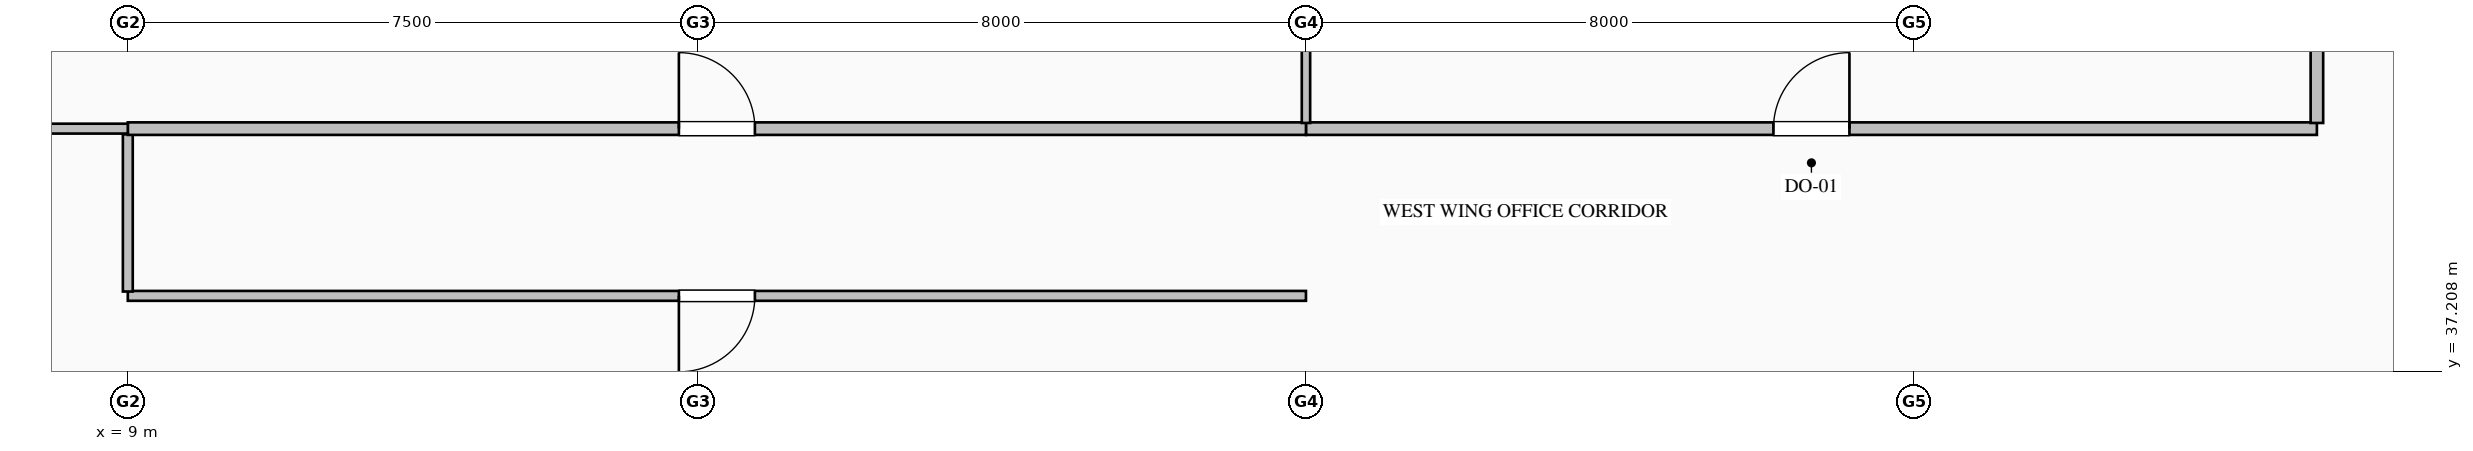
"""IFC4 building model, lengths in metres.
Left out: names, types, materials, properties, quantities, classifications, styles, units other than length and angle.
Written with IfcOpenShell. Run it as: python <this file> out.ifc"""

import sys

from ifc_helpers import new_model, si_unit, direction, frame, frame_2d, origin, place, context, subcontext, project, spatial, rectangle, extrude, element, fill, save


model = new_model("IFC4")
c1 = context("Model", 3, precision=1e-05, world=origin(), true_north=direction((0.0, 1.0)))
c2 = subcontext(c1, "Body", "Model", "MODEL_VIEW")
j1 = project(units=[si_unit("LENGTHUNIT", "METRE"), si_unit("PLANEANGLEUNIT", "RADIAN")], contexts=[c1])
p1 = place(None, origin())
s1 = spatial("IfcSite", under=j1, at=p1, CompositionType="ELEMENT")
p2 = place(p1, origin())
s2 = spatial("IfcBuilding", under=s1, at=p2, CompositionType="ELEMENT")
p3 = place(p2, frame((0.0, 0.0, 72.2)))
s3 = spatial("IfcBuildingStorey", under=s2, at=p3, CompositionType="ELEMENT", Elevation=72.2)
p4 = place(p3, frame((24.5, 40.4, 0.0), z_axis=(0.0, 0.0, 1.0), x_axis=(1.0, 0.0, 0.0)))
e1 = element("IfcWall", 1, at=p4, inside=s3, PredefinedType="PARTITIONING", context=c2, shape_type="SweptSolid", body=[
    extrude(rectangle(XDim=13.3, YDim=0.165, at=frame_2d((6.65, 0.0))), origin(), (0.0, 0.0, 1.0), 3.75),
])
p5 = place(p4, frame((6.15, 0.0, 0.0)))
e2 = element("IfcOpeningElement", 2, at=p5, cuts=e1, PredefinedType="OPENING", context=c2, shape_type="SweptSolid", body=[
    extrude(rectangle(XDim=1.0, YDim=2.15, at=frame_2d((0.5, 1.075))), frame((0.0, 0.093, 0.0), z_axis=(0.0, -1.0, 0.0), x_axis=(1.0, 0.0, 0.0)), (0.0, 0.0, 1.0), 0.185),
])
p6 = place(p3, frame((24.5, 38.2, 0.0), z_axis=(0.0, 0.0, 1.0), x_axis=(-1.0, 0.0, 0.0)))
e3 = element("IfcWall", 3, at=p6, inside=s3, PredefinedType="PARTITIONING", context=c2, shape_type="SweptSolid", body=[
    extrude(rectangle(XDim=15.5, YDim=0.13, at=frame_2d((7.75, 0.0))), origin(), (0.0, 0.0, 1.0), 3.75),
])
p7 = place(p6, frame((7.25, 0.0, 0.0)))
e4 = element("IfcOpeningElement", 4, at=p7, cuts=e3, PredefinedType="OPENING", context=c2, shape_type="SweptSolid", body=[
    extrude(rectangle(XDim=1.0, YDim=2.15, at=frame_2d((0.5, 1.075))), frame((0.0, 0.075, 0.0), z_axis=(0.0, -1.0, 0.0), x_axis=(1.0, 0.0, 0.0)), (0.0, 0.0, 1.0), 0.15),
])
p8 = place(p3, frame((9.0, 38.257, 0.0), z_axis=(0.0, 0.0, 1.0), x_axis=(0.0, 1.0, 0.0)))
e5 = element("IfcWall", 5, at=p8, inside=s3, PredefinedType="PARTITIONING", context=c2, shape_type="SweptSolid", body=[
    extrude(rectangle(XDim=2.068, YDim=0.13, at=frame_2d((1.034, 0.0))), origin(), (0.0, 0.0, 1.0), 3.042),
])
p9 = place(p3, frame((9.0, 40.4, 0.0), z_axis=(0.0, 0.0, 1.0), x_axis=(1.0, 0.0, 0.0)))
e6 = element("IfcWall", 6, at=p9, inside=s3, PredefinedType="PARTITIONING", context=c2, shape_type="SweptSolid", body=[
    extrude(rectangle(XDim=15.5, YDim=0.165, at=frame_2d((7.75, 0.0))), origin(), (0.0, 0.0, 1.0), 3.75),
])
p10 = place(p9, frame((7.25, 0.0, 0.0)))
e7 = element("IfcOpeningElement", 7, at=p10, cuts=e6, PredefinedType="OPENING", context=c2, shape_type="SweptSolid", body=[
    extrude(rectangle(XDim=1.0, YDim=2.15, at=frame_2d((0.5, 1.075))), frame((0.0, 0.093, 0.0), z_axis=(0.0, -1.0, 0.0), x_axis=(1.0, 0.0, 0.0)), (0.0, 0.0, 1.0), 0.185),
])
p11 = place(p3, frame((37.8, 40.475, 0.0), z_axis=(0.0, 0.0, 1.0), x_axis=(0.0, 1.0, 0.0)))
e8 = element("IfcWall", 8, at=p11, inside=s3, PredefinedType="PARTITIONING", context=c2, shape_type="SweptSolid", body=[
    extrude(rectangle(XDim=3.651, YDim=0.165, at=frame_2d((1.825, 0.0))), origin(), (0.0, 0.0, 1.0), 3.75),
])
p12 = place(p3, frame((24.5, 40.475, 0.0), z_axis=(0.0, 0.0, 1.0), x_axis=(0.0, 1.0, 0.0)))
e9 = element("IfcWall", 9, at=p12, inside=s3, PredefinedType="MOVABLE", context=c2, shape_type="SweptSolid", body=[
    extrude(rectangle(XDim=5.478, YDim=0.11, at=frame_2d((2.739, 0.0))), origin(), (0.0, 0.0, 1.0), 3.042),
])
p13 = place(p3, frame((0.332, 40.4, 0.0), z_axis=(0.0, 0.0, 1.0), x_axis=(1.0, 0.0, 0.0)))
e10 = element("IfcWall", 10, at=p13, inside=s3, PredefinedType="PARTITIONING", context=c2, shape_type="SweptSolid", body=[
    extrude(rectangle(XDim=8.668, YDim=0.13, at=frame_2d((4.334, 0.0))), origin(), (0.0, 0.0, 1.0), 3.75),
])
p14 = place(p5, origin())
e11 = element("IfcDoor", 11, at=p14, inside=s3, OperationType="SINGLE_SWING_RIGHT", PredefinedType="DOOR", context=c2, shape_type="SweptSolid", body=[
    extrude(rectangle(XDim=1.0, YDim=2.15, at=frame_2d((0.5, 1.075))), frame((0.0, 0.025, 0.0), z_axis=(0.0, -1.0, 0.0), x_axis=(1.0, 0.0, 0.0)), (0.0, 0.0, 1.0), 0.05),
])
fill(e2, e11)
p15 = place(p7, origin())
e12 = element("IfcDoor", 12, at=p15, inside=s3, OperationType="SINGLE_SWING_RIGHT", PredefinedType="DOOR", context=c2, shape_type="SweptSolid", body=[
    extrude(rectangle(XDim=1.0, YDim=2.15, at=frame_2d((0.5, 1.075))), frame((0.0, 0.025, 0.0), z_axis=(0.0, -1.0, 0.0), x_axis=(1.0, 0.0, 0.0)), (0.0, 0.0, 1.0), 0.05),
])
fill(e4, e12)
p16 = place(p10, origin())
e13 = element("IfcDoor", 13, at=p16, inside=s3, OperationType="SINGLE_SWING_LEFT", PredefinedType="DOOR", context=c2, shape_type="SweptSolid", body=[
    extrude(rectangle(XDim=1.0, YDim=2.15, at=frame_2d((0.5, 1.075))), frame((0.0, 0.025, 0.0), z_axis=(0.0, -1.0, 0.0), x_axis=(1.0, 0.0, 0.0)), (0.0, 0.0, 1.0), 0.05),
])
fill(e7, e13)
save(model, sys.argv[1])
